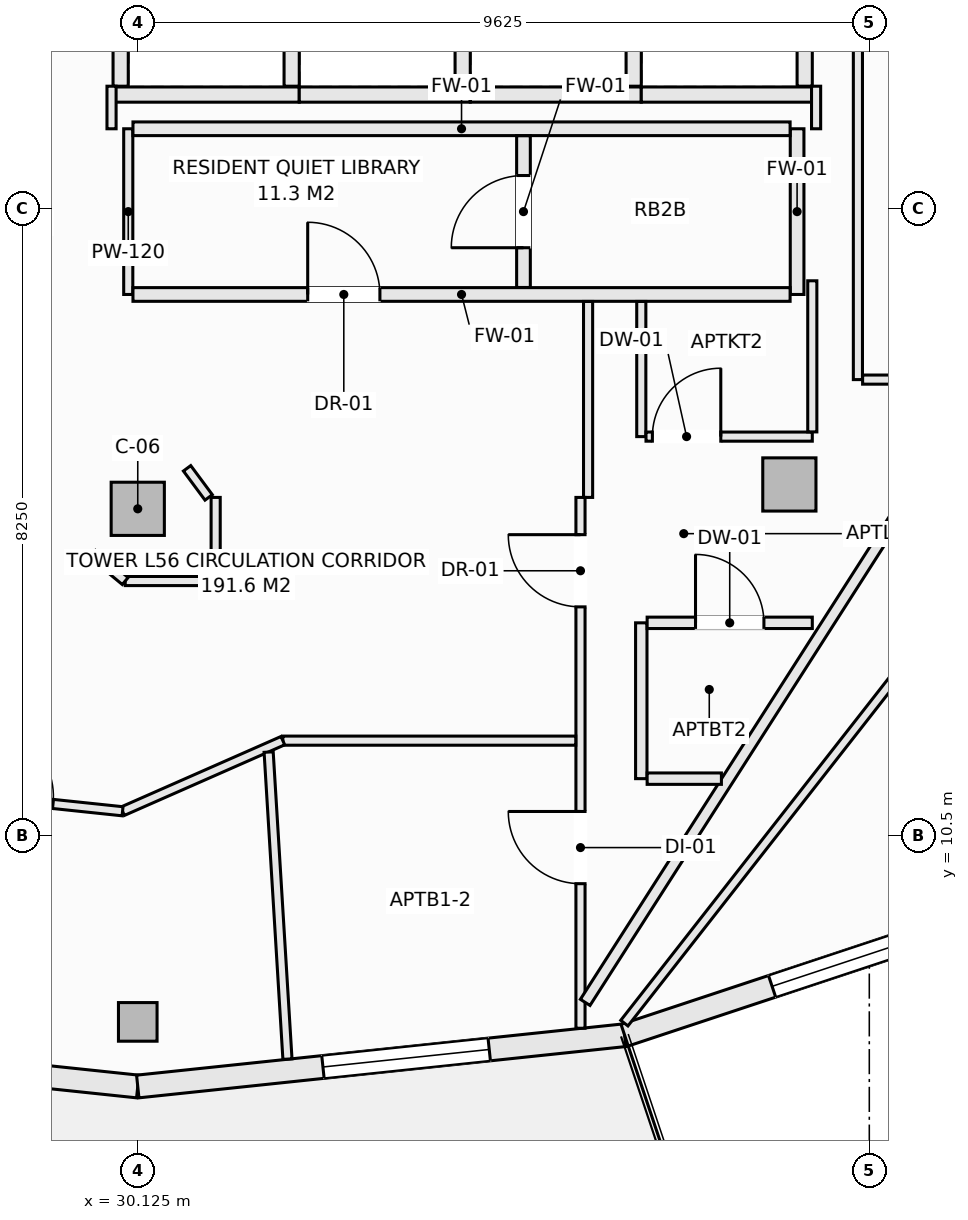
"""IFC4 building model, lengths in metres.
Left out: names, types, materials, properties, quantities, classifications, styles, units other than length and angle.
Written with IfcOpenShell. Run it as: python <this file> out.ifc"""

import sys

from ifc_helpers import new_model, si_unit, direction, frame, frame_2d, origin, origin_2d, place, context, subcontext, project, spatial, rectangle, hollow_rectangle, extrude, element, fill, save


model = new_model("IFC4")
c1 = context("Model", 3, precision=1e-05, world=origin(), true_north=direction((0.0, 1.0)))
c2 = subcontext(c1, "Body", "Model", "MODEL_VIEW")
j1 = project(units=[si_unit("LENGTHUNIT", "METRE"), si_unit("PLANEANGLEUNIT", "RADIAN")], contexts=[c1])
p1 = place(None, origin())
s1 = spatial("IfcSite", under=j1, at=p1, CompositionType="ELEMENT")
p2 = place(p1, origin())
s2 = spatial("IfcBuilding", under=s1, at=p2, CompositionType="ELEMENT")
p3 = place(p2, frame((0.0, 0.0, 212.9)))
s3 = spatial("IfcBuildingStorey", under=s2, at=p3, CompositionType="ELEMENT", Elevation=212.9)
p4 = place(p3, frame((30.125, 8.05, -0.27), z_axis=(0.0, 0.0, 1.0), x_axis=(1.0, 0.0, 0.0)))
e1 = element("IfcColumn", 1, at=p4, inside=s3, PredefinedType="COLUMN", context=c2, shape_type="SweptSolid", body=[
    extrude(hollow_rectangle(XDim=0.508, YDim=0.508, WallThickness=0.019, at=origin_2d()), origin(), (0.0, 0.0, 1.0), 3.3),
])
for number, where, z_axis, x_axis in (
    (2, (30.125, 14.8, -0.27), (0.0, 0.0, 1.0), (1.0, 0.0, 0.0)),
    (3, (38.698, 15.121, -0.27), (0.0, 0.0, 1.0), (1.0, 0.0, 0.0)),
):
    element("IfcColumn", number, at=place(p3, frame(where, z_axis=z_axis, x_axis=x_axis)), inside=s3, PredefinedType="COLUMN", context=c2, shape_type="SweptSolid", body=[
        extrude(rectangle(XDim=0.7, YDim=0.7, at=origin_2d()), origin(), (0.0, 0.0, 1.0), 3.3),
    ])
p5 = place(p3, frame((23.719, 7.875, 0.0), z_axis=(0.0, 0.0, 1.0), x_axis=(0.994497142298, -0.104763705363, 0.0)))
e4 = element("IfcWall", 4, at=p5, inside=s3, PredefinedType="SOLIDWALL", context=c2, shape_type="SweptSolid", body=[
    extrude(rectangle(XDim=6.441, YDim=0.3, at=frame_2d((3.221, 0.0))), origin(), (0.0, 0.0, 1.0), 2.605),
])
p6 = place(p5, frame((2.321, 0.0, 0.0)))
e5 = element("IfcOpeningElement", 5, at=p6, cuts=e4, PredefinedType="OPENING", context=c2, shape_type="SweptSolid", body=[
    extrude(rectangle(XDim=1.8, YDim=2.25, at=frame_2d((0.9, 1.125))), frame((0.0, 0.16, 0.0), z_axis=(0.0, -1.0, 0.0), x_axis=(1.0, 0.0, 0.0)), (0.0, 0.0, 1.0), 0.32),
])
p7 = place(p3, frame((30.125, 7.2, 0.0), z_axis=(0.0, 0.0, 1.0), x_axis=(0.994497142298, 0.104763705363, 0.0)))
e6 = element("IfcWall", 6, at=p7, inside=s3, PredefinedType="SOLIDWALL", context=c2, shape_type="SweptSolid", body=[
    extrude(rectangle(XDim=6.441, YDim=0.3, at=frame_2d((3.221, 0.0))), origin(), (0.0, 0.0, 1.0), 2.605),
])
p8 = place(p7, frame((2.45, 0.0, 0.72)))
e7 = element("IfcOpeningElement", 7, at=p8, cuts=e6, PredefinedType="OPENING", context=c2, shape_type="SweptSolid", body=[
    extrude(rectangle(XDim=2.2, YDim=1.65, at=frame_2d((1.1, 0.825))), frame((0.0, 0.16, 0.0), z_axis=(0.0, -1.0, 0.0), x_axis=(1.0, 0.0, 0.0)), (0.0, 0.0, 1.0), 0.32),
])
p9 = place(p3, frame((36.531, 7.875, 0.0), z_axis=(0.0, 0.0, 1.0), x_axis=(0.949240877604, 0.314550085495, 0.0)))
e8 = element("IfcWall", 8, at=p9, inside=s3, PredefinedType="SOLIDWALL", context=c2, shape_type="SweptSolid", body=[
    extrude(rectangle(XDim=6.288, YDim=0.3, at=frame_2d((3.144, 0.0))), origin(), (0.0, 0.0, 1.0), 2.605),
])
p10 = place(p9, frame((2.044, 0.0, 0.72)))
e9 = element("IfcOpeningElement", 9, at=p10, cuts=e8, PredefinedType="OPENING", context=c2, shape_type="SweptSolid", body=[
    extrude(rectangle(XDim=2.2, YDim=1.65, at=frame_2d((1.1, 0.825))), frame((0.0, 0.16, 0.0), z_axis=(0.0, -1.0, 0.0), x_axis=(1.0, 0.0, 0.0)), (0.0, 0.0, 1.0), 0.32),
])
p11 = place(p3, frame((29.8, 20.25, 0.0), z_axis=(0.0, 0.0, 1.0), x_axis=(1.0, 0.0, 0.0)))
e10 = element("IfcWall", 10, at=p11, inside=s3, PredefinedType="SOLIDWALL", context=c2, shape_type="SweptSolid", body=[
    extrude(rectangle(XDim=2.45, YDim=0.2, at=frame_2d((1.225, 0.0))), origin(), (0.0, 0.0, 1.0), 3.03),
])
for number, where, z_axis, x_axis in (
    (11, (29.9, 20.36, 0.0), (0.0, 0.0, 1.0), (0.0, 1.0, 0.0)),
    (12, (32.15, 20.36, 0.0), (0.0, 0.0, 1.0), (0.0, 1.0, 0.0)),
):
    element("IfcWall", number, at=place(p3, frame(where, z_axis=z_axis, x_axis=x_axis)), inside=s3, PredefinedType="SOLIDWALL", context=c2, shape_type="SweptSolid", body=[
        extrude(rectangle(XDim=2.43, YDim=0.2, at=frame_2d((1.215, 0.0))), origin(), (0.0, 0.0, 1.0), 3.03),
    ])
p12 = place(p3, frame((32.25, 20.25, 0.0), z_axis=(0.0, 0.0, 1.0), x_axis=(1.0, 0.0, 0.0)))
e13 = element("IfcWall", 13, at=p12, inside=s3, PredefinedType="SOLIDWALL", context=c2, shape_type="SweptSolid", body=[
    extrude(rectangle(XDim=2.25, YDim=0.2, at=frame_2d((1.125, 0.0))), origin(), (0.0, 0.0, 1.0), 3.03),
])
p13 = place(p3, frame((34.4, 20.36, 0.0), z_axis=(0.0, 0.0, 1.0), x_axis=(0.0, 1.0, 0.0)))
e14 = element("IfcWall", 14, at=p13, inside=s3, PredefinedType="SOLIDWALL", context=c2, shape_type="SweptSolid", body=[
    extrude(rectangle(XDim=2.43, YDim=0.2, at=frame_2d((1.215, 0.0))), origin(), (0.0, 0.0, 1.0), 3.03),
])
p14 = place(p3, frame((34.5, 20.25, 0.0), z_axis=(0.0, 0.0, 1.0), x_axis=(1.0, 0.0, 0.0)))
e15 = element("IfcWall", 15, at=p14, inside=s3, PredefinedType="SOLIDWALL", context=c2, shape_type="SweptSolid", body=[
    extrude(rectangle(XDim=2.25, YDim=0.2, at=frame_2d((1.125, 0.0))), origin(), (0.0, 0.0, 1.0), 3.03),
])
p15 = place(p3, frame((36.65, 20.36, 0.0), z_axis=(0.0, 0.0, 1.0), x_axis=(0.0, 1.0, 0.0)))
e16 = element("IfcWall", 16, at=p15, inside=s3, PredefinedType="SOLIDWALL", context=c2, shape_type="SweptSolid", body=[
    extrude(rectangle(XDim=2.43, YDim=0.2, at=frame_2d((1.215, 0.0))), origin(), (0.0, 0.0, 1.0), 3.03),
])
p16 = place(p3, frame((36.75, 20.25, 0.0), z_axis=(0.0, 0.0, 1.0), x_axis=(1.0, 0.0, 0.0)))
e17 = element("IfcWall", 17, at=p16, inside=s3, PredefinedType="SOLIDWALL", context=c2, shape_type="SweptSolid", body=[
    extrude(rectangle(XDim=2.25, YDim=0.2, at=frame_2d((1.125, 0.0))), origin(), (0.0, 0.0, 1.0), 3.03),
])
p17 = place(p3, frame((38.9, 20.36, 0.0), z_axis=(0.0, 0.0, 1.0), x_axis=(0.0, 1.0, 0.0)))
e18 = element("IfcWall", 18, at=p17, inside=s3, PredefinedType="SOLIDWALL", context=c2, shape_type="SweptSolid", body=[
    extrude(rectangle(XDim=2.43, YDim=0.2, at=frame_2d((1.215, 0.0))), origin(), (0.0, 0.0, 1.0), 3.03),
])
p18 = place(p3, frame((30.0, 17.62, 0.0), z_axis=(0.0, 0.0, 1.0), x_axis=(0.0, 1.0, 0.0)))
e19 = element("IfcWall", 19, at=p18, inside=s3, PredefinedType="PARTITIONING", context=c2, shape_type="SweptSolid", body=[
    extrude(rectangle(XDim=2.18, YDim=0.12, at=frame_2d((1.09, 0.0))), origin(), (0.0, 0.0, 1.0), 3.03),
])
p19 = place(p3, frame((38.8, 17.62, 0.0), z_axis=(0.0, 0.0, 1.0), x_axis=(0.0, 1.0, 0.0)))
e20 = element("IfcWall", 20, at=p19, inside=s3, PredefinedType="SOLIDWALL", context=c2, shape_type="SweptSolid", body=[
    extrude(rectangle(XDim=2.18, YDim=0.18, at=frame_2d((1.09, 0.0))), origin(), (0.0, 0.0, 1.0), 3.03),
])
p20 = place(p3, frame((30.062, 17.62, 0.0), z_axis=(0.0, 0.0, 1.0), x_axis=(1.0, 0.0, 0.0)))
e21 = element("IfcWall", 21, at=p20, inside=s3, PredefinedType="SOLIDWALL", context=c2, shape_type="SweptSolid", body=[
    extrude(rectangle(XDim=8.646, YDim=0.18, at=frame_2d((4.323, 0.0))), origin(), (0.0, 0.0, 1.0), 3.03),
])
p21 = place(p20, frame((2.299, 0.0, 0.0)))
e22 = element("IfcOpeningElement", 22, at=p21, cuts=e21, PredefinedType="OPENING", context=c2, shape_type="SweptSolid", body=[
    extrude(rectangle(XDim=0.95, YDim=2.1, at=frame_2d((0.475, 1.05))), frame((0.0, 0.1, 0.0), z_axis=(0.0, -1.0, 0.0), x_axis=(1.0, 0.0, 0.0)), (0.0, 0.0, 1.0), 0.2),
])
p22 = place(p3, frame((30.062, 19.8, 0.0), z_axis=(0.0, 0.0, 1.0), x_axis=(1.0, 0.0, 0.0)))
e23 = element("IfcWall", 23, at=p22, inside=s3, PredefinedType="SOLIDWALL", context=c2, shape_type="SweptSolid", body=[
    extrude(rectangle(XDim=8.646, YDim=0.18, at=frame_2d((4.323, 0.0))), origin(), (0.0, 0.0, 1.0), 3.03),
])
p23 = place(p3, frame((35.2, 17.712, 0.0), z_axis=(0.0, 0.0, 1.0), x_axis=(0.0, 1.0, 0.0)))
e24 = element("IfcWall", 24, at=p23, inside=s3, PredefinedType="SOLIDWALL", context=c2, shape_type="SweptSolid", body=[
    extrude(rectangle(XDim=1.996, YDim=0.18, at=frame_2d((0.998, 0.0))), origin(), (0.0, 0.0, 1.0), 3.03),
])
p24 = place(p23, frame((0.523, 0.0, 0.0)))
e25 = element("IfcOpeningElement", 25, at=p24, cuts=e24, PredefinedType="OPENING", context=c2, shape_type="SweptSolid", body=[
    extrude(rectangle(XDim=0.95, YDim=2.1, at=frame_2d((0.475, 1.05))), frame((0.0, 0.1, 0.0), z_axis=(0.0, -1.0, 0.0), x_axis=(1.0, 0.0, 0.0)), (0.0, 0.0, 1.0), 0.2),
])
p25 = place(p3, frame((39.05, 19.8, 0.0), z_axis=(0.0, 0.0, 1.0), x_axis=(0.0, 1.0, 0.0)))
e26 = element("IfcWall", 26, at=p25, inside=s3, PredefinedType="PARTITIONING", context=c2, shape_type="SweptSolid", body=[
    extrude(rectangle(XDim=0.56, YDim=0.12, at=frame_2d((0.28, 0.0))), origin(), (0.0, 0.0, 1.0), 3.03),
])
p26 = place(p3, frame((39.6, 16.5, 0.0), z_axis=(0.0, 0.0, 1.0), x_axis=(0.0, 1.0, 0.0)))
e27 = element("IfcWall", 27, at=p26, inside=s3, PredefinedType="PARTITIONING", context=c2, shape_type="SweptSolid", body=[
    extrude(rectangle(XDim=6.52, YDim=0.12, at=frame_2d((3.26, 0.0))), origin(), (0.0, 0.0, 1.0), 2.478),
])
p27 = place(p3, frame((36.527, 8.034, 0.0), z_axis=(0.0, 0.0, 1.0), x_axis=(0.616547497682, 0.787317714206, 0.0)))
e28 = element("IfcWall", 28, at=p27, inside=s3, PredefinedType="PARTITIONING", context=c2, shape_type="SweptSolid", body=[
    extrude(rectangle(XDim=13.151, YDim=0.12, at=frame_2d((6.576, 0.0))), origin(), (0.0, 0.0, 1.0), 3.03),
])
p28 = place(p27, frame((11.24, 0.0, 0.0)))
e29 = element("IfcOpeningElement", 29, at=p28, cuts=e28, PredefinedType="OPENING", context=c2, shape_type="SweptSolid", body=[
    extrude(rectangle(XDim=0.95, YDim=2.1, at=frame_2d((0.475, 1.05))), frame((0.0, 0.07, 0.0), z_axis=(0.0, -1.0, 0.0), x_axis=(1.0, 0.0, 0.0)), (0.0, 0.0, 1.0), 0.14),
])
p29 = place(p3, frame((39.662, 16.5, 0.0), z_axis=(0.0, 0.0, 1.0), x_axis=(1.0, 0.0, 0.0)))
e30 = element("IfcWall", 30, at=p29, inside=s3, PredefinedType="PARTITIONING", context=c2, shape_type="SweptSolid", body=[
    extrude(rectangle(XDim=3.416, YDim=0.12, at=frame_2d((1.708, 0.0))), origin(), (0.0, 0.0, 1.0), 2.77),
])
p30 = place(p3, frame((29.78, 19.8, 0.0), z_axis=(0.0, 0.0, 1.0), x_axis=(0.0, 1.0, 0.0)))
e31 = element("IfcWall", 31, at=p30, inside=s3, PredefinedType="PARTITIONING", context=c2, shape_type="SweptSolid", body=[
    extrude(rectangle(XDim=0.56, YDim=0.12, at=frame_2d((0.28, 0.0))), origin(), (0.0, 0.0, 1.0), 3.03),
])
p31 = place(p3, frame((36.05, 14.95, 0.0), z_axis=(0.0, 0.0, 1.0), x_axis=(0.0, 1.0, 0.0)))
e32 = element("IfcWall", 32, at=p31, inside=s3, PredefinedType="PARTITIONING", context=c2, shape_type="SweptSolid", body=[
    extrude(rectangle(XDim=2.578, YDim=0.12, at=frame_2d((1.289, 0.0))), origin(), (0.0, 0.0, 1.0), 3.03),
])
p32 = place(p3, frame((35.95, 7.966, 0.0), z_axis=(0.0, 0.0, 1.0), x_axis=(0.0, 1.0, 0.0)))
e33 = element("IfcWall", 33, at=p32, inside=s3, PredefinedType="PARTITIONING", context=c2, shape_type="SweptSolid", body=[
    extrude(rectangle(XDim=6.984, YDim=0.12, at=frame_2d((3.492, 0.0))), origin(), (0.0, 0.0, 1.0), 2.77),
])
p33 = place(p32, frame((5.544, 0.0, 0.0)))
e34 = element("IfcOpeningElement", 34, at=p33, cuts=e33, PredefinedType="OPENING", context=c2, shape_type="SweptSolid", body=[
    extrude(rectangle(XDim=0.95, YDim=2.1, at=frame_2d((0.475, 1.05))), frame((0.0, 0.07, 0.0), z_axis=(0.0, -1.0, 0.0), x_axis=(1.0, 0.0, 0.0)), (0.0, 0.0, 1.0), 0.14),
])
p34 = place(p32, frame((1.902, 0.0, 0.0)))
e35 = element("IfcOpeningElement", 35, at=p34, cuts=e33, PredefinedType="OPENING", context=c2, shape_type="SweptSolid", body=[
    extrude(rectangle(XDim=0.95, YDim=2.1, at=frame_2d((0.475, 1.05))), frame((0.0, 0.07, 0.0), z_axis=(0.0, -1.0, 0.0), x_axis=(1.0, 0.0, 0.0)), (0.0, 0.0, 1.0), 0.14),
])
p35 = place(p3, frame((32.034, 11.75, 0.0), z_axis=(0.0, 0.0, 1.0), x_axis=(1.0, 0.0, 0.0)))
e36 = element("IfcWall", 36, at=p35, inside=s3, PredefinedType="PARTITIONING", context=c2, shape_type="SweptSolid", body=[
    extrude(rectangle(XDim=3.854, YDim=0.12, at=frame_2d((1.927, 0.0))), origin(), (0.0, 0.0, 1.0), 3.03),
])
p36 = place(p3, frame((29.925, 10.821, 0.0), z_axis=(0.0, 0.0, 1.0), x_axis=(0.915147800009, 0.403118474072, 0.0)))
e37 = element("IfcWall", 37, at=p36, inside=s3, PredefinedType="PARTITIONING", context=c2, shape_type="SweptSolid", body=[
    extrude(rectangle(XDim=2.304, YDim=0.12, at=frame_2d((1.152, 0.0))), origin(), (0.0, 0.0, 1.0), 3.03),
])
p37 = place(p3, frame((27.15, 11.113, 0.0), z_axis=(0.0, 0.0, 1.0), x_axis=(0.994510245906, -0.104639241146, 0.0)))
e38 = element("IfcWall", 38, at=p37, inside=s3, PredefinedType="PARTITIONING", context=c2, shape_type="SweptSolid", body=[
    extrude(rectangle(XDim=2.791, YDim=0.12, at=frame_2d((1.395, 0.0))), origin(), (0.0, 0.0, 1.0), 3.03),
])
p38 = place(p37, frame((0.92, 0.0, 0.0)))
e39 = element("IfcOpeningElement", 39, at=p38, cuts=e38, PredefinedType="OPENING", context=c2, shape_type="SweptSolid", body=[
    extrude(rectangle(XDim=0.95, YDim=2.1, at=frame_2d((0.475, 1.05))), frame((0.0, 0.07, 0.0), z_axis=(0.0, -1.0, 0.0), x_axis=(1.0, 0.0, 0.0)), (0.0, 0.0, 1.0), 0.14),
])
p39 = place(p3, frame((29.96, 13.85, 0.0), z_axis=(0.0, 0.0, 1.0), x_axis=(1.0, 0.0, 0.0)))
e40 = element("IfcWall", 40, at=p39, inside=s3, PredefinedType="PARTITIONING", context=c2, shape_type="SweptSolid", body=[
    extrude(rectangle(XDim=1.19, YDim=0.12, at=frame_2d((0.595, 0.0))), origin(), (0.0, 0.0, 1.0), 3.03),
])
p40 = place(p3, frame((31.15, 13.912, 0.0), z_axis=(0.0, 0.0, 1.0), x_axis=(0.0, 1.0, 0.0)))
e41 = element("IfcWall", 41, at=p40, inside=s3, PredefinedType="PARTITIONING", context=c2, shape_type="SweptSolid", body=[
    extrude(rectangle(XDim=1.038, YDim=0.12, at=frame_2d((0.519, 0.0))), origin(), (0.0, 0.0, 1.0), 3.03),
])
p41 = place(p3, frame((30.774, 15.333, 0.0), z_axis=(0.0, 0.0, 1.0), x_axis=(0.595814974861, -0.803121731577, 0.0)))
e42 = element("IfcWall", 42, at=p41, inside=s3, PredefinedType="PARTITIONING", context=c2, shape_type="SweptSolid", body=[
    extrude(rectangle(XDim=0.477, YDim=0.12, at=frame_2d((0.239, 0.0))), origin(), (0.0, 0.0, 1.0), 3.03),
])
p42 = place(p3, frame((29.531, 14.206, 0.0), z_axis=(0.0, 0.0, 1.0), x_axis=(0.7695479554, -0.638589026166, 0.0)))
e43 = element("IfcWall", 43, at=p42, inside=s3, PredefinedType="PARTITIONING", context=c2, shape_type="SweptSolid", body=[
    extrude(rectangle(XDim=0.557, YDim=0.12, at=frame_2d((0.279, 0.0))), origin(), (0.0, 0.0, 1.0), 3.03),
])
p43 = place(p3, frame((31.847, 11.6, 0.0), z_axis=(0.0, 0.0, 1.0), x_axis=(0.061108836762, -0.998131108657, 0.0)))
e44 = element("IfcWall", 44, at=p43, inside=s3, PredefinedType="PARTITIONING", context=c2, shape_type="SweptSolid", body=[
    extrude(rectangle(XDim=4.047, YDim=0.12, at=frame_2d((2.023, 0.0))), origin(), (0.0, 0.0, 1.0), 3.03),
])
p44 = place(p3, frame((36.75, 11.25, 0.0), z_axis=(0.0, 0.0, 1.0), x_axis=(0.0, 1.0, 0.0)))
e45 = element("IfcWall", 45, at=p44, inside=s3, PredefinedType="PARTITIONING", context=c2, shape_type="SweptSolid", body=[
    extrude(rectangle(XDim=2.05, YDim=0.15, at=frame_2d((1.025, 0.0))), origin(), (0.0, 0.0, 1.0), 3.03),
])
p45 = place(p3, frame((36.75, 15.75, 0.0), z_axis=(0.0, 0.0, 1.0), x_axis=(0.0, 1.0, 0.0)))
e46 = element("IfcWall", 46, at=p45, inside=s3, PredefinedType="PARTITIONING", context=c2, shape_type="SweptSolid", body=[
    extrude(rectangle(XDim=1.778, YDim=0.12, at=frame_2d((0.889, 0.0))), origin(), (0.0, 0.0, 1.0), 3.03),
])
p46 = place(p3, frame((36.812, 15.75, 0.0), z_axis=(0.0, 0.0, 1.0), x_axis=(1.0, 0.0, 0.0)))
e47 = element("IfcWall", 47, at=p46, inside=s3, PredefinedType="PARTITIONING", context=c2, shape_type="SweptSolid", body=[
    extrude(rectangle(XDim=2.188, YDim=0.12, at=frame_2d((1.094, 0.0))), origin(), (0.0, 0.0, 1.0), 3.03),
])
p47 = place(p46, frame((0.084, 0.0, 0.0)))
e48 = element("IfcOpeningElement", 48, at=p47, cuts=e47, PredefinedType="OPENING", context=c2, shape_type="SweptSolid", body=[
    extrude(rectangle(XDim=0.9, YDim=2.1, at=frame_2d((0.45, 1.05))), frame((0.0, 0.07, 0.0), z_axis=(0.0, -1.0, 0.0), x_axis=(1.0, 0.0, 0.0)), (0.0, 0.0, 1.0), 0.14),
])
p48 = place(p3, frame((39.0, 15.812, 0.0), z_axis=(0.0, 0.0, 1.0), x_axis=(0.0, 1.0, 0.0)))
e49 = element("IfcWall", 49, at=p48, inside=s3, PredefinedType="PARTITIONING", context=c2, shape_type="SweptSolid", body=[
    extrude(rectangle(XDim=1.988, YDim=0.12, at=frame_2d((0.994, 0.0))), origin(), (0.0, 0.0, 1.0), 2.478),
])
p49 = place(p3, frame((36.012, 8.307, 0.0), z_axis=(0.0, 0.0, 1.0), x_axis=(0.539002742545, 0.842304008971, 0.0)))
e50 = element("IfcWall", 50, at=p49, inside=s3, PredefinedType="PARTITIONING", context=c2, shape_type="SweptSolid", body=[
    extrude(rectangle(XDim=9.654, YDim=0.15, at=frame_2d((4.827, 0.0))), origin(), (0.0, 0.0, 1.0), 3.03),
])
p50 = place(p3, frame((36.827, 13.3, 0.0), z_axis=(0.0, 0.0, 1.0), x_axis=(1.0, 0.0, 0.0)))
e51 = element("IfcWall", 51, at=p50, inside=s3, PredefinedType="PARTITIONING", context=c2, shape_type="SweptSolid", body=[
    extrude(rectangle(XDim=2.173, YDim=0.15, at=frame_2d((1.086, 0.0))), origin(), (0.0, 0.0, 1.0), 3.03),
])
p51 = place(p50, frame((0.636, 0.0, 0.0)))
e52 = element("IfcOpeningElement", 52, at=p51, cuts=e51, PredefinedType="OPENING", context=c2, shape_type="SweptSolid", body=[
    extrude(rectangle(XDim=0.9, YDim=2.1, at=frame_2d((0.45, 1.05))), frame((0.0, 0.085, 0.0), z_axis=(0.0, -1.0, 0.0), x_axis=(1.0, 0.0, 0.0)), (0.0, 0.0, 1.0), 0.17),
])
p52 = place(p3, frame((36.827, 11.25, 0.0), z_axis=(0.0, 0.0, 1.0), x_axis=(1.0, 0.0, 0.0)))
e53 = element("IfcWall", 53, at=p52, inside=s3, PredefinedType="PARTITIONING", context=c2, shape_type="SweptSolid", body=[
    extrude(rectangle(XDim=0.977, YDim=0.15, at=frame_2d((0.489, 0.0))), origin(), (0.0, 0.0, 1.0), 3.03),
])
p53 = place(p8, origin())
e54 = element("IfcWindow", 54, at=p53, inside=s3, PartitioningType="SINGLE_PANEL", PredefinedType="WINDOW", context=c2, shape_type="SweptSolid", body=[
    extrude(rectangle(XDim=2.2, YDim=1.65, at=frame_2d((1.1, 0.825))), frame((0.0, 0.03, 0.0), z_axis=(0.0, -1.0, 0.0), x_axis=(1.0, 0.0, 0.0)), (0.0, 0.0, 1.0), 0.06),
])
fill(e7, e54)
p54 = place(p10, origin())
e55 = element("IfcWindow", 55, at=p54, inside=s3, PartitioningType="SINGLE_PANEL", PredefinedType="WINDOW", context=c2, shape_type="SweptSolid", body=[
    extrude(rectangle(XDim=2.2, YDim=1.65, at=frame_2d((1.1, 0.825))), frame((0.0, 0.03, 0.0), z_axis=(0.0, -1.0, 0.0), x_axis=(1.0, 0.0, 0.0)), (0.0, 0.0, 1.0), 0.06),
])
fill(e9, e55)
p55 = place(p21, origin())
e56 = element("IfcDoor", 56, at=p55, inside=s3, OperationType="SINGLE_SWING_LEFT", PredefinedType="DOOR", context=c2, shape_type="SweptSolid", body=[
    extrude(rectangle(XDim=0.95, YDim=2.1, at=frame_2d((0.475, 1.05))), frame((0.0, 0.025, 0.0), z_axis=(0.0, -1.0, 0.0), x_axis=(1.0, 0.0, 0.0)), (0.0, 0.0, 1.0), 0.05),
])
fill(e22, e56)
p56 = place(p38, origin())
e57 = element("IfcDoor", 57, at=p56, inside=s3, OperationType="SINGLE_SWING_LEFT", PredefinedType="DOOR", context=c2, shape_type="SweptSolid", body=[
    extrude(rectangle(XDim=0.95, YDim=2.1, at=frame_2d((0.475, 1.05))), frame((0.0, 0.025, 0.0), z_axis=(0.0, -1.0, 0.0), x_axis=(1.0, 0.0, 0.0)), (0.0, 0.0, 1.0), 0.05),
])
fill(e39, e57)
p57 = place(p33, origin())
e58 = element("IfcDoor", 58, at=p57, inside=s3, OperationType="SINGLE_SWING_RIGHT", PredefinedType="DOOR", context=c2, shape_type="SweptSolid", body=[
    extrude(rectangle(XDim=0.95, YDim=2.1, at=frame_2d((0.475, 1.05))), frame((0.0, 0.025, 0.0), z_axis=(0.0, -1.0, 0.0), x_axis=(1.0, 0.0, 0.0)), (0.0, 0.0, 1.0), 0.05),
])
fill(e34, e58)
p58 = place(p47, origin())
e59 = element("IfcDoor", 59, at=p58, inside=s3, OperationType="SINGLE_SWING_RIGHT", PredefinedType="DOOR", context=c2, shape_type="SweptSolid", body=[
    extrude(rectangle(XDim=0.9, YDim=2.1, at=frame_2d((0.45, 1.05))), frame((0.0, 0.025, 0.0), z_axis=(0.0, -1.0, 0.0), x_axis=(1.0, 0.0, 0.0)), (0.0, 0.0, 1.0), 0.05),
])
fill(e48, e59)
p59 = place(p51, origin())
e60 = element("IfcDoor", 60, at=p59, inside=s3, OperationType="SINGLE_SWING_LEFT", PredefinedType="DOOR", context=c2, shape_type="SweptSolid", body=[
    extrude(rectangle(XDim=0.9, YDim=2.1, at=frame_2d((0.45, 1.05))), frame((0.0, 0.025, 0.0), z_axis=(0.0, -1.0, 0.0), x_axis=(1.0, 0.0, 0.0)), (0.0, 0.0, 1.0), 0.05),
])
fill(e52, e60)
p60 = place(p34, origin())
e61 = element("IfcDoor", 61, at=p60, inside=s3, OperationType="SINGLE_SWING_RIGHT", PredefinedType="DOOR", context=c2, shape_type="SweptSolid", body=[
    extrude(rectangle(XDim=0.95, YDim=2.1, at=frame_2d((0.475, 1.05))), frame((0.0, 0.025, 0.0), z_axis=(0.0, -1.0, 0.0), x_axis=(1.0, 0.0, 0.0)), (0.0, 0.0, 1.0), 0.05),
])
fill(e35, e61)
p61 = place(p24, origin())
e62 = element("IfcDoor", 62, at=p61, inside=s3, OperationType="SINGLE_SWING_LEFT", PredefinedType="DOOR", context=c2, shape_type="SweptSolid", body=[
    extrude(rectangle(XDim=0.95, YDim=2.1, at=frame_2d((0.475, 1.05))), frame((0.0, 0.025, 0.0), z_axis=(0.0, -1.0, 0.0), x_axis=(1.0, 0.0, 0.0)), (0.0, 0.0, 1.0), 0.05),
])
fill(e25, e62)
save(model, sys.argv[1])
